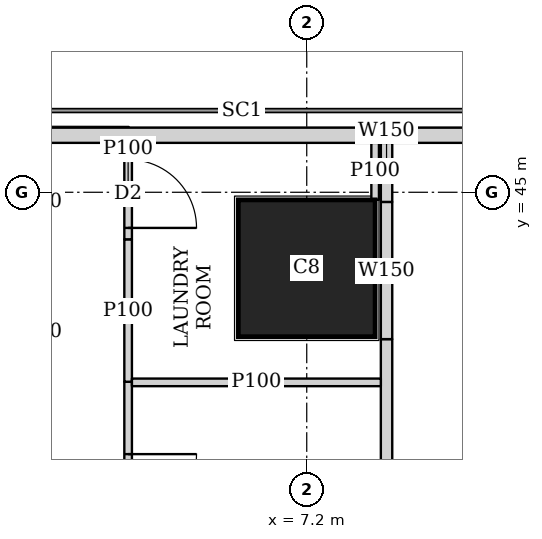
"""IFC4 building model, lengths in metres.
Left out: names, types, materials, properties, quantities, classifications, styles, units other than length and angle.
Written with IfcOpenShell. Run it as: python <this file> out.ifc"""

import sys

from ifc_helpers import new_model, si_unit, direction, frame, frame_2d, origin, origin_2d, place, context, subcontext, project, spatial, rectangle, extrude, element, fill, save


model = new_model("IFC4")
c1 = context("Model", 3, precision=1e-05, world=origin(), true_north=direction((0.0, 1.0)))
c2 = subcontext(c1, "Body", "Model", "MODEL_VIEW")
j1 = project(units=[si_unit("LENGTHUNIT", "METRE"), si_unit("PLANEANGLEUNIT", "RADIAN")], contexts=[c1])
p1 = place(None, origin())
s1 = spatial("IfcSite", under=j1, at=p1, CompositionType="ELEMENT")
p2 = place(p1, origin())
s2 = spatial("IfcBuilding", under=s1, at=p2, CompositionType="ELEMENT")
p3 = place(p2, frame((0.0, 0.0, 169.55)))
s3 = spatial("IfcBuildingStorey", under=s2, at=p3, CompositionType="ELEMENT", Elevation=169.55)
p4 = place(p3, frame((7.2, 44.0, 0.0), z_axis=(0.0, 0.0, 1.0), x_axis=(1.0, 0.0, 0.0)))
e1 = element("IfcColumn", 1, at=p4, inside=s3, PredefinedType="COLUMN", context=c2, shape_type="SweptSolid", body=[
    extrude(rectangle(XDim=1.8, YDim=1.8, at=origin_2d()), origin(), (0.0, 0.0, 1.0), 3.75),
])
p5 = place(p3, frame((40.106, 45.75, 0.0), z_axis=(0.0, 0.0, 1.0), x_axis=(-1.0, 0.0, 0.0)))
e2 = element("IfcWall", 2, at=p5, inside=s3, PredefinedType="SOLIDWALL", context=c2, shape_type="SweptSolid", body=[
    extrude(rectangle(XDim=37.943, YDim=0.2, at=frame_2d((18.971, 0.0))), origin(), (0.0, 0.0, 1.0), 3.5),
])
p6 = place(p5, frame((8.606, 0.0, 0.9)))
e3 = element("IfcOpeningElement", 3, at=p6, cuts=e2, PredefinedType="OPENING", context=c2, shape_type="SweptSolid", body=[
    extrude(rectangle(XDim=1.8, YDim=1.5, at=frame_2d((0.9, 0.75))), frame((0.0, 0.11, 0.0), z_axis=(0.0, -1.0, 0.0), x_axis=(1.0, 0.0, 0.0)), (0.0, 0.0, 1.0), 0.22),
])
p7 = place(p5, frame((12.206, 0.0, 0.9)))
e4 = element("IfcOpeningElement", 4, at=p7, cuts=e2, PredefinedType="OPENING", context=c2, shape_type="SweptSolid", body=[
    extrude(rectangle(XDim=1.8, YDim=1.5, at=frame_2d((0.9, 0.75))), frame((0.0, 0.11, 0.0), z_axis=(0.0, -1.0, 0.0), x_axis=(1.0, 0.0, 0.0)), (0.0, 0.0, 1.0), 0.22),
])
p8 = place(p5, frame((15.806, 0.0, 0.9)))
e5 = element("IfcOpeningElement", 5, at=p8, cuts=e2, PredefinedType="OPENING", context=c2, shape_type="SweptSolid", body=[
    extrude(rectangle(XDim=1.8, YDim=1.5, at=frame_2d((0.9, 0.75))), frame((0.0, 0.11, 0.0), z_axis=(0.0, -1.0, 0.0), x_axis=(1.0, 0.0, 0.0)), (0.0, 0.0, 1.0), 0.22),
])
p9 = place(p5, frame((19.406, 0.0, 0.9)))
e6 = element("IfcOpeningElement", 6, at=p9, cuts=e2, PredefinedType="OPENING", context=c2, shape_type="SweptSolid", body=[
    extrude(rectangle(XDim=1.8, YDim=1.5, at=frame_2d((0.9, 0.75))), frame((0.0, 0.11, 0.0), z_axis=(0.0, -1.0, 0.0), x_axis=(1.0, 0.0, 0.0)), (0.0, 0.0, 1.0), 0.22),
])
p10 = place(p5, frame((23.006, 0.0, 0.9)))
e7 = element("IfcOpeningElement", 7, at=p10, cuts=e2, PredefinedType="OPENING", context=c2, shape_type="SweptSolid", body=[
    extrude(rectangle(XDim=1.8, YDim=1.5, at=frame_2d((0.9, 0.75))), frame((0.0, 0.11, 0.0), z_axis=(0.0, -1.0, 0.0), x_axis=(1.0, 0.0, 0.0)), (0.0, 0.0, 1.0), 0.22),
])
p11 = place(p5, frame((26.606, 0.0, 0.9)))
e8 = element("IfcOpeningElement", 8, at=p11, cuts=e2, PredefinedType="OPENING", context=c2, shape_type="SweptSolid", body=[
    extrude(rectangle(XDim=1.8, YDim=1.5, at=frame_2d((0.9, 0.75))), frame((0.0, 0.11, 0.0), z_axis=(0.0, -1.0, 0.0), x_axis=(1.0, 0.0, 0.0)), (0.0, 0.0, 1.0), 0.22),
])
p12 = place(p3, frame((8.25, 1.957, 0.0), z_axis=(0.0, 0.0, 1.0), x_axis=(0.0, 1.0, 0.0)))
e9 = element("IfcWall", 9, at=p12, inside=s3, PredefinedType="SOLIDWALL", context=c2, shape_type="SweptSolid", body=[
    extrude(rectangle(XDim=41.111, YDim=0.15, at=frame_2d((20.556, 0.0))), origin(), (0.0, 0.0, 1.0), 3.5),
])
p13 = place(p12, frame((10.642, 0.0, 0.0)))
e10 = element("IfcOpeningElement", 10, at=p13, cuts=e9, PredefinedType="OPENING", context=c2, shape_type="SweptSolid", body=[
    extrude(rectangle(XDim=1.0, YDim=2.1, at=frame_2d((0.5, 1.05))), frame((0.0, 0.085, 0.0), z_axis=(0.0, -1.0, 0.0), x_axis=(1.0, 0.0, 0.0)), (0.0, 0.0, 1.0), 0.17),
])
p14 = place(p12, frame((15.042, 0.0, 0.0)))
e11 = element("IfcOpeningElement", 11, at=p14, cuts=e9, PredefinedType="OPENING", context=c2, shape_type="SweptSolid", body=[
    extrude(rectangle(XDim=1.0, YDim=2.1, at=frame_2d((0.5, 1.05))), frame((0.0, 0.085, 0.0), z_axis=(0.0, -1.0, 0.0), x_axis=(1.0, 0.0, 0.0)), (0.0, 0.0, 1.0), 0.17),
])
p15 = place(p12, frame((22.543, 0.0, 0.0)))
e12 = element("IfcOpeningElement", 12, at=p15, cuts=e9, PredefinedType="OPENING", context=c2, shape_type="SweptSolid", body=[
    extrude(rectangle(XDim=1.0, YDim=2.1, at=frame_2d((0.5, 1.05))), frame((0.0, 0.085, 0.0), z_axis=(0.0, -1.0, 0.0), x_axis=(1.0, 0.0, 0.0)), (0.0, 0.0, 1.0), 0.17),
])
p16 = place(p12, frame((33.142, 0.0, 0.0)))
e13 = element("IfcOpeningElement", 13, at=p16, cuts=e9, PredefinedType="OPENING", context=c2, shape_type="SweptSolid", body=[
    extrude(rectangle(XDim=1.0, YDim=2.1, at=frame_2d((0.5, 1.05))), frame((0.0, 0.085, 0.0), z_axis=(0.0, -1.0, 0.0), x_axis=(1.0, 0.0, 0.0)), (0.0, 0.0, 1.0), 0.17),
])
p17 = place(p3, frame((8.25, 43.068, 0.0), z_axis=(0.0, 0.0, 1.0), x_axis=(0.0, 1.0, 0.0)))
e14 = element("IfcWall", 14, at=p17, inside=s3, PredefinedType="SOLIDWALL", context=c2, shape_type="SweptSolid", body=[
    extrude(rectangle(XDim=1.805, YDim=0.15, at=frame_2d((0.902, 0.0))), origin(), (0.0, 0.0, 1.0), 2.1),
])
p18 = place(p3, frame((8.25, 44.873, 0.0), z_axis=(0.0, 0.0, 1.0), x_axis=(0.0, 1.0, 0.0)))
e15 = element("IfcWall", 15, at=p18, inside=s3, PredefinedType="SOLIDWALL", context=c2, shape_type="SweptSolid", body=[
    extrude(rectangle(XDim=0.777, YDim=0.15, at=frame_2d((0.388, 0.0))), origin(), (0.0, 0.0, 1.0), 3.5),
])
p19 = place(p3, frame((8.1, 45.65, 0.0), z_axis=(0.0, 0.0, 1.0), x_axis=(0.0, -1.0, 0.0)))
e16 = element("IfcWall", 16, at=p19, inside=s3, PredefinedType="PARTITIONING", context=c2, shape_type="SweptSolid", body=[
    extrude(rectangle(XDim=0.749, YDim=0.1, at=frame_2d((0.375, 0.0))), origin(), (0.0, 0.0, 1.0), 3.5),
])
p20 = place(p3, frame((4.85, 37.5, 0.0), z_axis=(0.0, 0.0, 1.0), x_axis=(0.0, 1.0, 0.0)))
e17 = element("IfcWall", 17, at=p20, inside=s3, PredefinedType="PARTITIONING", context=c2, shape_type="SweptSolid", body=[
    extrude(rectangle(XDim=5.007, YDim=0.1, at=frame_2d((2.503, 0.0))), origin(), (0.0, 0.0, 1.0), 3.5),
])
p21 = place(p20, frame((0.655, 0.0, 0.0)))
e18 = element("IfcOpeningElement", 18, at=p21, cuts=e17, PredefinedType="OPENING", context=c2, shape_type="SweptSolid", body=[
    extrude(rectangle(XDim=0.9, YDim=2.1, at=frame_2d((0.45, 1.05))), frame((0.0, 0.06, 0.0), z_axis=(0.0, -1.0, 0.0), x_axis=(1.0, 0.0, 0.0)), (0.0, 0.0, 1.0), 0.12),
])
p22 = place(p20, frame((3.155, 0.0, 0.0)))
e19 = element("IfcOpeningElement", 19, at=p22, cuts=e17, PredefinedType="OPENING", context=c2, shape_type="SweptSolid", body=[
    extrude(rectangle(XDim=0.9, YDim=2.1, at=frame_2d((0.45, 1.05))), frame((0.0, 0.06, 0.0), z_axis=(0.0, -1.0, 0.0), x_axis=(1.0, 0.0, 0.0)), (0.0, 0.0, 1.0), 0.12),
])
p23 = place(p3, frame((4.85, 42.507, 0.0), z_axis=(0.0, 0.0, 1.0), x_axis=(0.0, 1.0, 0.0)))
e20 = element("IfcWall", 20, at=p23, inside=s3, PredefinedType="PARTITIONING", context=c2, shape_type="SweptSolid", body=[
    extrude(rectangle(XDim=1.874, YDim=0.1, at=frame_2d((0.937, 0.0))), origin(), (0.0, 0.0, 1.0), 2.1),
])
p24 = place(p3, frame((4.85, 44.381, 0.0), z_axis=(0.0, 0.0, 1.0), x_axis=(0.0, 1.0, 0.0)))
e21 = element("IfcWall", 21, at=p24, inside=s3, PredefinedType="PARTITIONING", context=c2, shape_type="SweptSolid", body=[
    extrude(rectangle(XDim=1.269, YDim=0.1, at=frame_2d((0.634, 0.0))), origin(), (0.0, 0.0, 1.0), 3.5),
])
p25 = place(p24, frame((0.15, 0.0, 0.0)))
e22 = element("IfcOpeningElement", 22, at=p25, cuts=e21, PredefinedType="OPENING", context=c2, shape_type="SweptSolid", body=[
    extrude(rectangle(XDim=0.9, YDim=2.1, at=frame_2d((0.45, 1.05))), frame((0.0, 0.06, 0.0), z_axis=(0.0, -1.0, 0.0), x_axis=(1.0, 0.0, 0.0)), (0.0, 0.0, 1.0), 0.12),
])
p26 = place(p3, frame((4.9, 42.499, 0.0), z_axis=(0.0, 0.0, 1.0), x_axis=(1.0, 0.0, 0.0)))
e23 = element("IfcWall", 23, at=p26, inside=s3, PredefinedType="PARTITIONING", context=c2, shape_type="SweptSolid", body=[
    extrude(rectangle(XDim=3.275, YDim=0.1, at=frame_2d((1.638, 0.0))), origin(), (0.0, 0.0, 1.0), 3.5),
])
p27 = place(p25, origin())
e24 = element("IfcDoor", 24, at=p27, inside=s3, OperationType="SINGLE_SWING_RIGHT", PredefinedType="DOOR", context=c2, shape_type="SweptSolid", body=[
    extrude(rectangle(XDim=0.9, YDim=2.1, at=frame_2d((0.45, 1.05))), frame((0.0, 0.025, 0.0), z_axis=(0.0, -1.0, 0.0), x_axis=(1.0, 0.0, 0.0)), (0.0, 0.0, 1.0), 0.05),
])
fill(e22, e24)
p28 = place(p22, origin())
e25 = element("IfcDoor", 25, at=p28, inside=s3, OperationType="SINGLE_SWING_LEFT", PredefinedType="DOOR", context=c2, shape_type="SweptSolid", body=[
    extrude(rectangle(XDim=0.9, YDim=2.1, at=frame_2d((0.45, 1.05))), frame((0.0, 0.025, 0.0), z_axis=(0.0, -1.0, 0.0), x_axis=(1.0, 0.0, 0.0)), (0.0, 0.0, 1.0), 0.05),
])
fill(e19, e25)
save(model, sys.argv[1])
